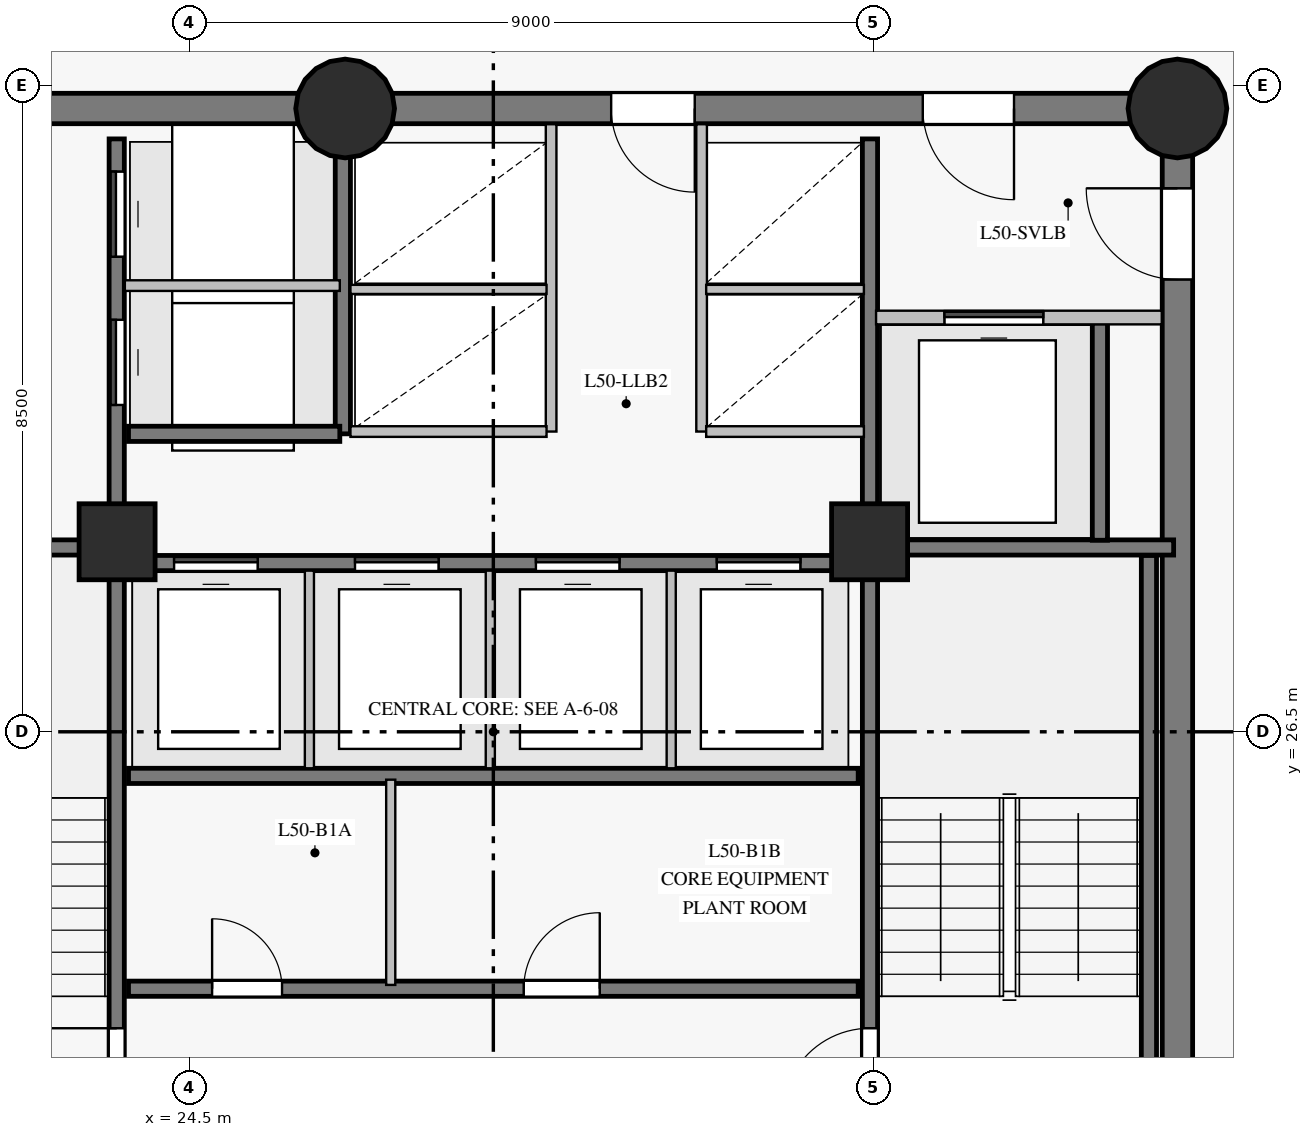
"""IFC4 building model, lengths in metres.
Left out: names, types, materials, properties, quantities, classifications, styles, units other than length and angle.
Written with IfcOpenShell. Run it as: python <this file> out.ifc"""

import sys

from ifc_helpers import new_model, si_unit, direction, frame, frame_2d, origin, origin_with_axes, origin_2d, place, context, subcontext, project, spatial, rectangle, circle, extrude, source, transform, mapped, element, fill, save


model = new_model("IFC4")
c1 = context("Model", 3, precision=1e-05, world=origin(), true_north=direction((0.0, 1.0)))
c2 = subcontext(c1, "Body", "Model", "MODEL_VIEW")
j1 = project(units=[si_unit("LENGTHUNIT", "METRE"), si_unit("PLANEANGLEUNIT", "RADIAN")], contexts=[c1])
p1 = place(None, origin())
s1 = spatial("IfcSite", under=j1, at=p1, CompositionType="ELEMENT")
p2 = place(p1, origin())
s2 = spatial("IfcBuilding", under=s1, at=p2, CompositionType="ELEMENT")
p3 = place(p2, frame((0.0, 0.0, 174.85)))
s3 = spatial("IfcBuildingStorey", under=s2, at=p3, CompositionType="ELEMENT", Elevation=174.85)
p4 = place(p3, frame((37.5, 18.3, 0.0), z_axis=(0.0, 0.0, 1.0), x_axis=(0.0, 1.0, 0.0)))
e1 = element("IfcWall", 1, at=p4, inside=s3, PredefinedType="SHEAR", context=c2, shape_type="SweptSolid", body=[
    extrude(rectangle(XDim=16.4, YDim=0.4, at=frame_2d((8.2, 0.0))), origin(), (0.0, 0.0, 1.0), 2.825),
])
p5 = place(p4, frame((14.15, 0.0, 0.0)))
e2 = element("IfcOpeningElement", 2, at=p5, cuts=e1, PredefinedType="OPENING", context=c2, shape_type="SweptSolid", body=[
    extrude(rectangle(XDim=1.2, YDim=2.15, at=frame_2d((0.6, 1.075))), frame((0.0, 0.21, 0.0), z_axis=(0.0, -1.0, 0.0), x_axis=(1.0, 0.0, 0.0)), (0.0, 0.0, 1.0), 0.42),
])
p6 = place(p3, frame((37.5, 34.7, 0.0), z_axis=(0.0, 0.0, 1.0), x_axis=(-1.0, 0.0, 0.0)))
e3 = element("IfcWall", 3, at=p6, inside=s3, PredefinedType="SHEAR", context=c2, shape_type="SweptSolid", body=[
    extrude(rectangle(XDim=10.95, YDim=0.4, at=frame_2d((5.475, 0.0))), origin(), (0.0, 0.0, 1.0), 2.825),
])
p7 = place(p6, frame((2.15, 0.0, 0.0)))
e4 = element("IfcOpeningElement", 4, at=p7, cuts=e3, PredefinedType="OPENING", context=c2, shape_type="SweptSolid", body=[
    extrude(rectangle(XDim=1.2, YDim=2.15, at=frame_2d((0.6, 1.075))), frame((0.0, 0.21, 0.0), z_axis=(0.0, -1.0, 0.0), x_axis=(1.0, 0.0, 0.0)), (0.0, 0.0, 1.0), 0.42),
])
p8 = place(p6, frame((6.35, 0.0, 0.0)))
e5 = element("IfcOpeningElement", 5, at=p8, cuts=e3, PredefinedType="OPENING", context=c2, shape_type="SweptSolid", body=[
    extrude(rectangle(XDim=1.1, YDim=2.15, at=frame_2d((0.55, 1.075))), frame((0.0, 0.21, 0.0), z_axis=(0.0, -1.0, 0.0), x_axis=(1.0, 0.0, 0.0)), (0.0, 0.0, 1.0), 0.42),
])
p9 = place(p3, frame((26.55, 34.7, 0.0), z_axis=(0.0, 0.0, 1.0), x_axis=(-1.0, 0.0, 0.0)))
e6 = element("IfcWall", 6, at=p9, inside=s3, PredefinedType="SHEAR", context=c2, shape_type="SweptSolid", body=[
    extrude(rectangle(XDim=7.05, YDim=0.4, at=frame_2d((3.525, 0.0))), origin(), (0.0, 0.0, 1.0), 2.825),
])
p10 = place(p9, frame((4.25, 0.0, 0.0)))
e7 = element("IfcOpeningElement", 7, at=p10, cuts=e6, PredefinedType="OPENING", context=c2, shape_type="SweptSolid", body=[
    extrude(rectangle(XDim=1.1, YDim=2.15, at=frame_2d((0.55, 1.075))), frame((0.0, 0.21, 0.0), z_axis=(0.0, -1.0, 0.0), x_axis=(1.0, 0.0, 0.0)), (0.0, 0.0, 1.0), 0.42),
])
m1 = source(origin_with_axes(), c2, "Body", "SweptSolid", [
    extrude(circle(Radius=0.65, at=origin_2d()), origin(), (0.0, 0.0, 1.0), 3.05),
])
for number, where, z_axis, x_axis in (
    (8, (26.55, 34.7, 0.0), (0.0, 0.0, 1.0), (1.0, 0.0, 0.0)),
    (9, (37.5, 34.7, 0.0), (0.0, 0.0, 1.0), (1.0, 0.0, 0.0)),
):
    element("IfcColumn", number, at=place(p3, frame(where, z_axis=z_axis, x_axis=x_axis)), inside=s3, PredefinedType="COLUMN", context=c2, shape_type="MappedRepresentation", body=[
        mapped(m1, transform((0.0, 0.0, 0.0), scale=1.0)),
    ])
m2 = source(origin_with_axes(), c2, "Body", "SweptSolid", [
    extrude(rectangle(XDim=1.0, YDim=1.0, at=origin_2d()), origin(), (0.0, 0.0, 1.0), 3.05),
])
for number, where, z_axis, x_axis in (
    (10, (23.55, 29.0, 0.0), (0.0, 0.0, 1.0), (1.0, 0.0, 0.0)),
    (11, (33.45, 29.0, 0.0), (0.0, 0.0, 1.0), (1.0, 0.0, 0.0)),
):
    element("IfcColumn", number, at=place(p3, frame(where, z_axis=z_axis, x_axis=x_axis)), inside=s3, PredefinedType="COLUMN", context=c2, shape_type="MappedRepresentation", body=[
        mapped(m2, transform((0.0, 0.0, 0.0), scale=1.0)),
    ])
p11 = place(p3, frame((23.545, 18.7, 0.0), z_axis=(0.0, 0.0, 1.0), x_axis=(0.0, 1.0, 0.0)))
e12 = element("IfcWall", 12, at=p11, inside=s3, PredefinedType="SHEAR", context=c2, shape_type="SweptSolid", body=[
    extrude(rectangle(XDim=15.6, YDim=0.2, at=frame_2d((7.8, 0.0))), origin(), (0.0, 0.0, 1.0), 2.825),
])
p12 = place(p11, frame((2.75, 0.0, 0.0)))
e13 = element("IfcOpeningElement", 13, at=p12, cuts=e12, PredefinedType="OPENING", context=c2, shape_type="SweptSolid", body=[
    extrude(rectangle(XDim=1.15, YDim=2.15, at=frame_2d((0.575, 1.075))), frame((0.0, 0.11, 0.0), z_axis=(0.0, -1.0, 0.0), x_axis=(1.0, 0.0, 0.0)), (0.0, 0.0, 1.0), 0.22),
])
p13 = place(p11, frame((0.14, 0.0, 0.0)))
e14 = element("IfcOpeningElement", 14, at=p13, cuts=e12, PredefinedType="OPENING", context=c2, shape_type="SweptSolid", body=[
    extrude(rectangle(XDim=0.88, YDim=2.1, at=frame_2d((0.44, 1.05))), frame((0.0, 0.11, 0.0), z_axis=(0.0, -1.0, 0.0), x_axis=(1.0, 0.0, 0.0)), (0.0, 0.0, 1.0), 0.22),
])
p14 = place(p11, frame((1.36, 0.0, 0.0)))
e15 = element("IfcOpeningElement", 15, at=p14, cuts=e12, PredefinedType="OPENING", context=c2, shape_type="SweptSolid", body=[
    extrude(rectangle(XDim=0.88, YDim=2.1, at=frame_2d((0.44, 1.05))), frame((0.0, 0.11, 0.0), z_axis=(0.0, -1.0, 0.0), x_axis=(1.0, 0.0, 0.0)), (0.0, 0.0, 1.0), 0.22),
])
p15 = place(p11, frame((12.1, 0.0, 0.0)))
e16 = element("IfcOpeningElement", 16, at=p15, cuts=e12, PredefinedType="OPENING", context=c2, shape_type="SweptSolid", body=[
    extrude(rectangle(XDim=1.12, YDim=2.15, at=frame_2d((0.56, 1.075))), frame((0.0, 0.11, 0.0), z_axis=(0.0, -1.0, 0.0), x_axis=(1.0, 0.0, 0.0)), (0.0, 0.0, 1.0), 0.22),
])
p16 = place(p11, frame((14.05, 0.0, 0.0)))
e17 = element("IfcOpeningElement", 17, at=p16, cuts=e12, PredefinedType="OPENING", context=c2, shape_type="SweptSolid", body=[
    extrude(rectangle(XDim=1.12, YDim=2.15, at=frame_2d((0.56, 1.075))), frame((0.0, 0.11, 0.0), z_axis=(0.0, -1.0, 0.0), x_axis=(1.0, 0.0, 0.0)), (0.0, 0.0, 1.0), 0.22),
])
p17 = place(p3, frame((33.455, 18.7, 0.0), z_axis=(0.0, 0.0, 1.0), x_axis=(0.0, 1.0, 0.0)))
e18 = element("IfcWall", 18, at=p17, inside=s3, PredefinedType="SHEAR", context=c2, shape_type="SweptSolid", body=[
    extrude(rectangle(XDim=15.6, YDim=0.2, at=frame_2d((7.8, 0.0))), origin(), (0.0, 0.0, 1.0), 2.825),
])
p18 = place(p17, frame((2.75, 0.0, 0.0)))
e19 = element("IfcOpeningElement", 19, at=p18, cuts=e18, PredefinedType="OPENING", context=c2, shape_type="SweptSolid", body=[
    extrude(rectangle(XDim=1.15, YDim=2.15, at=frame_2d((0.575, 1.075))), frame((0.0, 0.11, 0.0), z_axis=(0.0, -1.0, 0.0), x_axis=(1.0, 0.0, 0.0)), (0.0, 0.0, 1.0), 0.22),
])
p19 = place(p17, frame((0.55, 0.0, 0.0)))
e20 = element("IfcOpeningElement", 20, at=p19, cuts=e18, PredefinedType="OPENING", context=c2, shape_type="SweptSolid", body=[
    extrude(rectangle(XDim=0.94, YDim=2.1, at=frame_2d((0.47, 1.05))), frame((0.0, 0.11, 0.0), z_axis=(0.0, -1.0, 0.0), x_axis=(1.0, 0.0, 0.0)), (0.0, 0.0, 1.0), 0.22),
])
p20 = place(p3, frame((23.7, 23.12, 0.0), z_axis=(0.0, 0.0, 1.0), x_axis=(1.0, 0.0, 0.0)))
e21 = element("IfcWall", 21, at=p20, inside=s3, PredefinedType="SHEAR", context=c2, shape_type="SweptSolid", body=[
    extrude(rectangle(XDim=9.6, YDim=0.2, at=frame_2d((4.8, 0.0))), origin(), (0.0, 0.0, 1.0), 2.825),
])
p21 = place(p20, frame((1.1, 0.0, 0.0)))
e22 = element("IfcOpeningElement", 22, at=p21, cuts=e21, PredefinedType="OPENING", context=c2, shape_type="SweptSolid", body=[
    extrude(rectangle(XDim=0.92, YDim=2.1, at=frame_2d((0.46, 1.05))), frame((0.0, 0.11, 0.0), z_axis=(0.0, -1.0, 0.0), x_axis=(1.0, 0.0, 0.0)), (0.0, 0.0, 1.0), 0.22),
])
p22 = place(p20, frame((5.2, 0.0, 0.0)))
e23 = element("IfcOpeningElement", 23, at=p22, cuts=e21, PredefinedType="OPENING", context=c2, shape_type="SweptSolid", body=[
    extrude(rectangle(XDim=1.0, YDim=2.15, at=frame_2d((0.5, 1.075))), frame((0.0, 0.11, 0.0), z_axis=(0.0, -1.0, 0.0), x_axis=(1.0, 0.0, 0.0)), (0.0, 0.0, 1.0), 0.22),
])
p23 = place(p3, frame((23.7, 25.92, 0.0), z_axis=(0.0, 0.0, 1.0), x_axis=(1.0, 0.0, 0.0)))
e24 = element("IfcWall", 24, at=p23, inside=s3, PredefinedType="SHEAR", context=c2, shape_type="SweptSolid", body=[
    extrude(rectangle(XDim=9.6, YDim=0.2, at=frame_2d((4.8, 0.0))), origin(), (0.0, 0.0, 1.0), 2.825),
])
p24 = place(p3, frame((23.7, 28.72, 0.0), z_axis=(0.0, 0.0, 1.0), x_axis=(1.0, 0.0, 0.0)))
e25 = element("IfcWall", 25, at=p24, inside=s3, PredefinedType="SHEAR", context=c2, shape_type="SweptSolid", body=[
    extrude(rectangle(XDim=9.6, YDim=0.2, at=frame_2d((4.8, 0.0))), origin(), (0.0, 0.0, 1.0), 2.825),
])
p25 = place(p24, frame((0.6, 0.0, 0.0)))
e26 = element("IfcOpeningElement", 26, at=p25, cuts=e25, PredefinedType="OPENING", context=c2, shape_type="SweptSolid", body=[
    extrude(rectangle(XDim=1.1, YDim=2.15, at=frame_2d((0.55, 1.075))), frame((0.0, 0.11, 0.0), z_axis=(0.0, -1.0, 0.0), x_axis=(1.0, 0.0, 0.0)), (0.0, 0.0, 1.0), 0.22),
])
p26 = place(p24, frame((2.98, 0.0, 0.0)))
e27 = element("IfcOpeningElement", 27, at=p26, cuts=e25, PredefinedType="OPENING", context=c2, shape_type="SweptSolid", body=[
    extrude(rectangle(XDim=1.1, YDim=2.15, at=frame_2d((0.55, 1.075))), frame((0.0, 0.11, 0.0), z_axis=(0.0, -1.0, 0.0), x_axis=(1.0, 0.0, 0.0)), (0.0, 0.0, 1.0), 0.22),
])
p27 = place(p24, frame((5.36, 0.0, 0.0)))
e28 = element("IfcOpeningElement", 28, at=p27, cuts=e25, PredefinedType="OPENING", context=c2, shape_type="SweptSolid", body=[
    extrude(rectangle(XDim=1.1, YDim=2.15, at=frame_2d((0.55, 1.075))), frame((0.0, 0.11, 0.0), z_axis=(0.0, -1.0, 0.0), x_axis=(1.0, 0.0, 0.0)), (0.0, 0.0, 1.0), 0.22),
])
p28 = place(p24, frame((7.74, 0.0, 0.0)))
e29 = element("IfcOpeningElement", 29, at=p28, cuts=e25, PredefinedType="OPENING", context=c2, shape_type="SweptSolid", body=[
    extrude(rectangle(XDim=1.1, YDim=2.15, at=frame_2d((0.55, 1.075))), frame((0.0, 0.11, 0.0), z_axis=(0.0, -1.0, 0.0), x_axis=(1.0, 0.0, 0.0)), (0.0, 0.0, 1.0), 0.22),
])
p29 = place(p3, frame((37.125, 21.32, 0.0), z_axis=(0.0, 0.0, 1.0), x_axis=(0.0, 1.0, 0.0)))
e30 = element("IfcWall", 30, at=p29, inside=s3, PredefinedType="SHEAR", context=c2, shape_type="SweptSolid", body=[
    extrude(rectangle(XDim=7.5, YDim=0.2, at=frame_2d((3.75, 0.0))), origin(), (0.0, 0.0, 1.0), 2.825),
])
for number, where, z_axis, x_axis in (
    (31, (33.455, 28.925, 0.0), (0.0, 0.0, 1.0), (1.0, 0.0, 0.0)),
    (32, (19.55, 28.925, 0.0), (0.0, 0.0, 1.0), (1.0, 0.0, 0.0)),
):
    element("IfcWall", number, at=place(p3, frame(where, z_axis=z_axis, x_axis=x_axis)), inside=s3, PredefinedType="SHEAR", context=c2, shape_type="SweptSolid", body=[
        extrude(rectangle(XDim=3.995, YDim=0.2, at=frame_2d((1.998, 0.0))), origin(), (0.0, 0.0, 1.0), 2.825),
    ])
p30 = place(p3, frame((26.52, 30.42, 0.0), z_axis=(0.0, 0.0, 1.0), x_axis=(0.0, 1.0, 0.0)))
e33 = element("IfcWall", 33, at=p30, inside=s3, PredefinedType="SHEAR", context=c2, shape_type="SweptSolid", body=[
    extrude(rectangle(XDim=3.86, YDim=0.2, at=frame_2d((1.93, 0.0))), origin(), (0.0, 0.0, 1.0), 2.825),
])
p31 = place(p3, frame((36.48, 29.02, 0.0), z_axis=(0.0, 0.0, 1.0), x_axis=(0.0, 1.0, 0.0)))
e34 = element("IfcWall", 34, at=p31, inside=s3, PredefinedType="SHEAR", context=c2, shape_type="SweptSolid", body=[
    extrude(rectangle(XDim=2.86, YDim=0.2, at=frame_2d((1.43, 0.0))), origin(), (0.0, 0.0, 1.0), 2.825),
])
p32 = place(p3, frame((23.7, 30.42, 0.0), z_axis=(0.0, 0.0, 1.0), x_axis=(1.0, 0.0, 0.0)))
e35 = element("IfcWall", 35, at=p32, inside=s3, PredefinedType="SHEAR", context=c2, shape_type="SweptSolid", body=[
    extrude(rectangle(XDim=2.78, YDim=0.2, at=frame_2d((1.39, 0.0))), origin(), (0.0, 0.0, 1.0), 2.825),
])
for number, where, z_axis, x_axis in (
    (36, (29.26, 30.45, 0.0), (0.0, 0.0, 1.0), (0.0, 1.0, 0.0)),
    (37, (31.24, 30.45, 0.0), (0.0, 0.0, 1.0), (0.0, 1.0, 0.0)),
):
    element("IfcWall", number, at=place(p3, frame(where, z_axis=z_axis, x_axis=x_axis)), inside=s3, PredefinedType="PARTITIONING", context=c2, shape_type="SweptSolid", body=[
        extrude(rectangle(XDim=4.043, YDim=0.14, at=frame_2d((2.021, 0.0))), origin(), (0.0, 0.0, 1.0), 2.825),
    ])
p33 = place(p3, frame((33.535, 31.95, 0.0), z_axis=(0.0, 0.0, 1.0), x_axis=(1.0, 0.0, 0.0)))
e38 = element("IfcWall", 38, at=p33, inside=s3, PredefinedType="PARTITIONING", context=c2, shape_type="SweptSolid", body=[
    extrude(rectangle(XDim=3.759, YDim=0.18, at=frame_2d((1.879, 0.0))), origin(), (0.0, 0.0, 1.0), 2.825),
])
p34 = place(p33, frame((0.9, 0.0, 0.0)))
e39 = element("IfcOpeningElement", 39, at=p34, cuts=e38, PredefinedType="OPENING", context=c2, shape_type="SweptSolid", body=[
    extrude(rectangle(XDim=1.3, YDim=2.2, at=frame_2d((0.65, 1.1))), frame((0.0, 0.1, 0.0), z_axis=(0.0, -1.0, 0.0), x_axis=(1.0, 0.0, 0.0)), (0.0, 0.0, 1.0), 0.2),
])
p35 = place(p3, frame((23.652, 32.37, 0.0), z_axis=(0.0, 0.0, 1.0), x_axis=(1.0, 0.0, 0.0)))
e40 = element("IfcWall", 40, at=p35, inside=s3, PredefinedType="PARTITIONING", context=c2, shape_type="SweptSolid", body=[
    extrude(rectangle(XDim=2.828, YDim=0.14, at=frame_2d((1.414, 0.0))), origin(), (0.0, 0.0, 1.0), 2.825),
])
p36 = place(p3, frame((27.15, 23.17, 0.0), z_axis=(0.0, 0.0, 1.0), x_axis=(0.0, 1.0, 0.0)))
e41 = element("IfcWall", 41, at=p36, inside=s3, PredefinedType="PARTITIONING", context=c2, shape_type="SweptSolid", body=[
    extrude(rectangle(XDim=2.7, YDim=0.12, at=frame_2d((1.35, 0.0))), origin(), (0.0, 0.0, 1.0), 2.825),
])
for number, where, z_axis, x_axis in (
    (42, (26.08, 26.02, 0.0), (0.0, 0.0, 1.0), (0.0, 1.0, 0.0)),
    (43, (28.46, 26.02, 0.0), (0.0, 0.0, 1.0), (0.0, 1.0, 0.0)),
    (44, (30.84, 26.02, 0.0), (0.0, 0.0, 1.0), (0.0, 1.0, 0.0)),
):
    element("IfcWall", number, at=place(p3, frame(where, z_axis=z_axis, x_axis=x_axis)), inside=s3, PredefinedType="PARTITIONING", context=c2, shape_type="SweptSolid", body=[
        extrude(rectangle(XDim=2.6, YDim=0.12, at=frame_2d((1.3, 0.0))), origin(), (0.0, 0.0, 1.0), 2.825),
    ])
p37 = place(p3, frame((26.62, 30.45, 0.0), z_axis=(0.0, 0.0, 1.0), x_axis=(1.0, 0.0, 0.0)))
e45 = element("IfcWall", 45, at=p37, inside=s3, PredefinedType="PARTITIONING", context=c2, shape_type="SweptSolid", body=[
    extrude(rectangle(XDim=2.58, YDim=0.14, at=frame_2d((1.29, 0.0))), origin(), (0.0, 0.0, 1.0), 2.825),
])
p38 = place(p3, frame((26.62, 32.32, 0.0), z_axis=(0.0, 0.0, 1.0), x_axis=(1.0, 0.0, 0.0)))
e46 = element("IfcWall", 46, at=p38, inside=s3, PredefinedType="PARTITIONING", context=c2, shape_type="SweptSolid", body=[
    extrude(rectangle(XDim=2.58, YDim=0.12, at=frame_2d((1.29, 0.0))), origin(), (0.0, 0.0, 1.0), 2.825),
])
p39 = place(p3, frame((31.3, 30.45, 0.0), z_axis=(0.0, 0.0, 1.0), x_axis=(1.0, 0.0, 0.0)))
e47 = element("IfcWall", 47, at=p39, inside=s3, PredefinedType="PARTITIONING", context=c2, shape_type="SweptSolid", body=[
    extrude(rectangle(XDim=2.075, YDim=0.14, at=frame_2d((1.038, 0.0))), origin(), (0.0, 0.0, 1.0), 2.825),
])
p40 = place(p3, frame((31.3, 32.32, 0.0), z_axis=(0.0, 0.0, 1.0), x_axis=(1.0, 0.0, 0.0)))
e48 = element("IfcWall", 48, at=p40, inside=s3, PredefinedType="PARTITIONING", context=c2, shape_type="SweptSolid", body=[
    extrude(rectangle(XDim=2.075, YDim=0.12, at=frame_2d((1.038, 0.0))), origin(), (0.0, 0.0, 1.0), 2.825),
])
m3 = source(origin_with_axes(), c2, "Body", "SweptSolid", [
    extrude(rectangle(XDim=1.15, YDim=2.15, at=frame_2d((0.575, 1.075))), frame((0.0, 0.025, 0.0), z_axis=(0.0, -1.0, 0.0), x_axis=(1.0, 0.0, 0.0)), (0.0, 0.0, 1.0), 0.05),
])
p41 = place(p12, origin())
e49 = element("IfcDoor", 49, at=p41, inside=s3, OperationType="SINGLE_SWING_RIGHT", PredefinedType="DOOR", context=c2, shape_type="MappedRepresentation", body=[
    mapped(m3, transform((0.0, 0.0, 0.0), scale=1.0)),
])
fill(e13, e49)
p42 = place(p18, origin())
e50 = element("IfcDoor", 50, at=p42, inside=s3, OperationType="SINGLE_SWING_LEFT", PredefinedType="DOOR", context=c2, shape_type="MappedRepresentation", body=[
    mapped(m3, transform((0.0, 0.0, 0.0), scale=1.0)),
])
fill(e19, e50)
m4 = source(origin_with_axes(), c2, "Body", "SweptSolid", [
    extrude(rectangle(XDim=1.2, YDim=2.15, at=frame_2d((0.6, 1.075))), frame((0.0, 0.025, 0.0), z_axis=(0.0, -1.0, 0.0), x_axis=(1.0, 0.0, 0.0)), (0.0, 0.0, 1.0), 0.05),
])
p43 = place(p5, origin())
e51 = element("IfcDoor", 51, at=p43, inside=s3, OperationType="SINGLE_SWING_RIGHT", PredefinedType="DOOR", context=c2, shape_type="MappedRepresentation", body=[
    mapped(m4, transform((0.0, 0.0, 0.0), scale=1.0)),
])
fill(e2, e51)
p44 = place(p7, origin())
e52 = element("IfcDoor", 52, at=p44, inside=s3, OperationType="SINGLE_SWING_LEFT", PredefinedType="DOOR", context=c2, shape_type="MappedRepresentation", body=[
    mapped(m4, transform((0.0, 0.0, 0.0), scale=1.0)),
])
fill(e4, e52)
m5 = source(origin_with_axes(), c2, "Body", "SweptSolid", [
    extrude(rectangle(XDim=1.3, YDim=2.2, at=frame_2d((0.65, 1.1))), frame((0.0, 0.025, 0.0), z_axis=(0.0, -1.0, 0.0), x_axis=(1.0, 0.0, 0.0)), (0.0, 0.0, 1.0), 0.05),
])
p45 = place(p34, origin())
e53 = element("IfcDoor", 53, at=p45, inside=s3, OperationType="SLIDING_TO_LEFT", PredefinedType="DOOR", context=c2, shape_type="MappedRepresentation", body=[
    mapped(m5, transform((0.0, 0.0, 0.0), scale=1.0)),
])
fill(e39, e53)
m6 = source(origin_with_axes(), c2, "Body", "SweptSolid", [
    extrude(rectangle(XDim=0.92, YDim=2.1, at=frame_2d((0.46, 1.05))), frame((0.0, 0.025, 0.0), z_axis=(0.0, -1.0, 0.0), x_axis=(1.0, 0.0, 0.0)), (0.0, 0.0, 1.0), 0.05),
])
p46 = place(p21, origin())
e54 = element("IfcDoor", 54, at=p46, inside=s3, OperationType="SINGLE_SWING_LEFT", PredefinedType="DOOR", context=c2, shape_type="MappedRepresentation", body=[
    mapped(m6, transform((0.0, 0.0, 0.0), scale=1.0)),
])
fill(e22, e54)
m7 = source(origin_with_axes(), c2, "Body", "SweptSolid", [
    extrude(rectangle(XDim=1.0, YDim=2.15, at=frame_2d((0.5, 1.075))), frame((0.0, 0.025, 0.0), z_axis=(0.0, -1.0, 0.0), x_axis=(1.0, 0.0, 0.0)), (0.0, 0.0, 1.0), 0.05),
])
p47 = place(p22, origin())
e55 = element("IfcDoor", 55, at=p47, inside=s3, OperationType="SINGLE_SWING_RIGHT", PredefinedType="DOOR", context=c2, shape_type="MappedRepresentation", body=[
    mapped(m7, transform((0.0, 0.0, 0.0), scale=1.0)),
])
fill(e23, e55)
m8 = source(origin_with_axes(), c2, "Body", "SweptSolid", [
    extrude(rectangle(XDim=1.1, YDim=2.15, at=frame_2d((0.55, 1.075))), frame((0.0, 0.025, 0.0), z_axis=(0.0, -1.0, 0.0), x_axis=(1.0, 0.0, 0.0)), (0.0, 0.0, 1.0), 0.05),
])
p48 = place(p25, origin())
e56 = element("IfcDoor", 56, at=p48, inside=s3, OperationType="SLIDING_TO_LEFT", PredefinedType="DOOR", context=c2, shape_type="MappedRepresentation", body=[
    mapped(m8, transform((0.0, 0.0, 0.0), scale=1.0)),
])
fill(e26, e56)
p49 = place(p26, origin())
e57 = element("IfcDoor", 57, at=p49, inside=s3, OperationType="SLIDING_TO_RIGHT", PredefinedType="DOOR", context=c2, shape_type="MappedRepresentation", body=[
    mapped(m8, transform((0.0, 0.0, 0.0), scale=1.0)),
])
fill(e27, e57)
p50 = place(p27, origin())
e58 = element("IfcDoor", 58, at=p50, inside=s3, OperationType="SLIDING_TO_LEFT", PredefinedType="DOOR", context=c2, shape_type="MappedRepresentation", body=[
    mapped(m8, transform((0.0, 0.0, 0.0), scale=1.0)),
])
fill(e28, e58)
p51 = place(p28, origin())
e59 = element("IfcDoor", 59, at=p51, inside=s3, OperationType="SLIDING_TO_RIGHT", PredefinedType="DOOR", context=c2, shape_type="MappedRepresentation", body=[
    mapped(m8, transform((0.0, 0.0, 0.0), scale=1.0)),
])
fill(e29, e59)
p52 = place(p8, origin())
e60 = element("IfcDoor", 60, at=p52, inside=s3, OperationType="SINGLE_SWING_LEFT", PredefinedType="DOOR", context=c2, shape_type="MappedRepresentation", body=[
    mapped(m8, transform((0.0, 0.0, 0.0), scale=1.0)),
])
fill(e5, e60)
m9 = source(origin_with_axes(), c2, "Body", "SweptSolid", [
    extrude(rectangle(XDim=1.12, YDim=2.15, at=frame_2d((0.56, 1.075))), frame((0.0, 0.025, 0.0), z_axis=(0.0, -1.0, 0.0), x_axis=(1.0, 0.0, 0.0)), (0.0, 0.0, 1.0), 0.05),
])
p53 = place(p15, origin())
e61 = element("IfcDoor", 61, at=p53, inside=s3, OperationType="SLIDING_TO_LEFT", PredefinedType="DOOR", context=c2, shape_type="MappedRepresentation", body=[
    mapped(m9, transform((0.0, 0.0, 0.0), scale=1.0)),
])
fill(e16, e61)
p54 = place(p16, origin())
e62 = element("IfcDoor", 62, at=p54, inside=s3, OperationType="SLIDING_TO_RIGHT", PredefinedType="DOOR", context=c2, shape_type="MappedRepresentation", body=[
    mapped(m9, transform((0.0, 0.0, 0.0), scale=1.0)),
])
fill(e17, e62)
save(model, sys.argv[1])
